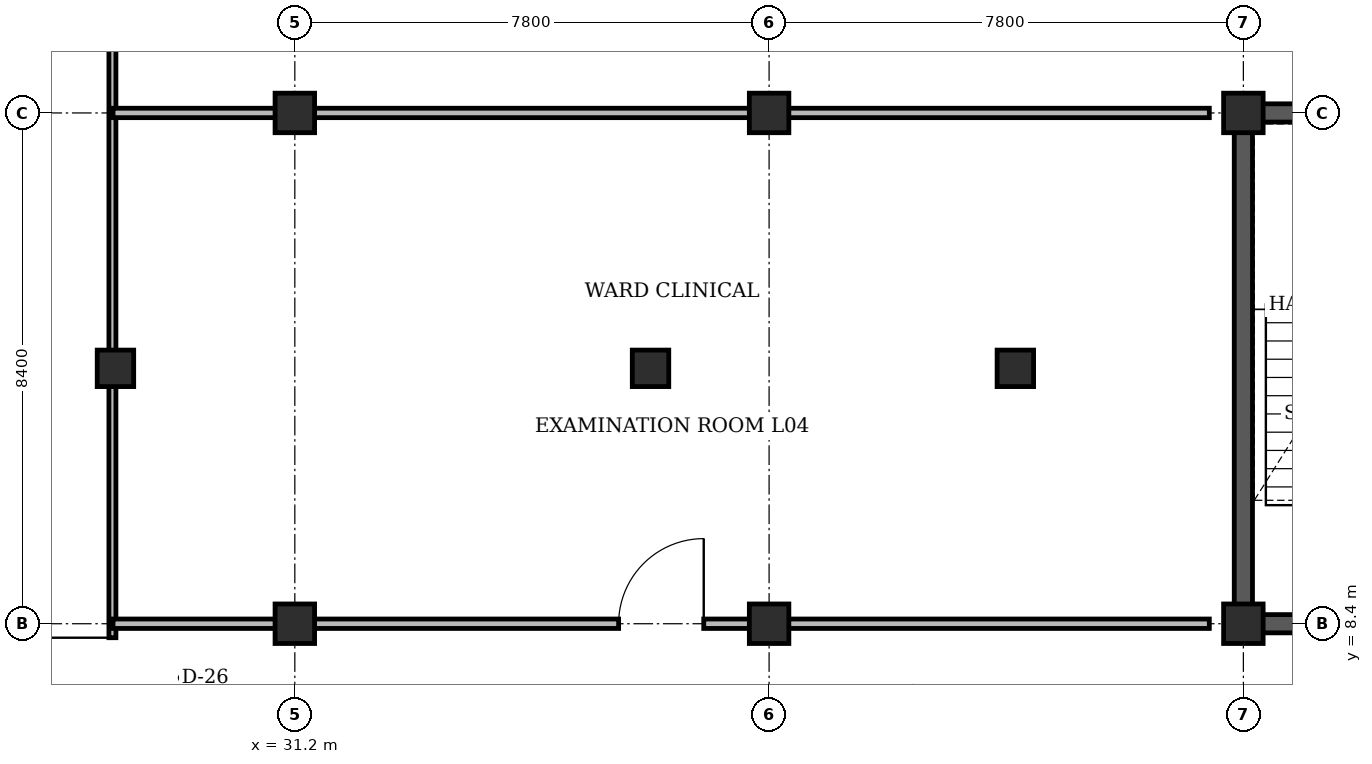
"""IFC4 building model, lengths in metres.
Left out: names, types, materials, properties, quantities, classifications, styles, units other than length and angle.
Written with IfcOpenShell. Run it as: python <this file> out.ifc"""

import sys

from ifc_helpers import new_model, si_unit, direction, frame, frame_2d, origin, origin_2d, place, context, subcontext, project, spatial, rectangle, circle, extrude, element, fill, save


model = new_model("IFC4")
c1 = context("Model", 3, precision=1e-05, world=origin(), true_north=direction((0.0, 1.0)))
c2 = subcontext(c1, "Body", "Model", "MODEL_VIEW")
j1 = project(units=[si_unit("LENGTHUNIT", "METRE"), si_unit("PLANEANGLEUNIT", "RADIAN")], contexts=[c1])
p1 = place(None, origin())
s1 = spatial("IfcSite", under=j1, at=p1, CompositionType="ELEMENT")
p2 = place(p1, origin())
s2 = spatial("IfcBuilding", under=s1, at=p2, CompositionType="ELEMENT")
p3 = place(p2, frame((0.0, 0.0, 18.0)))
s3 = spatial("IfcBuildingStorey", under=s2, at=p3, CompositionType="ELEMENT", Elevation=18.0)
p4 = place(p3, frame((46.65, 16.8, 0.0), z_axis=(0.0, 0.0, 1.0), x_axis=(1.0, 0.0, 0.0)))
e1 = element("IfcWall", 1, at=p4, inside=s3, PredefinedType="SHEAR", context=c2, shape_type="SweptSolid", body=[
    extrude(rectangle(XDim=8.1, YDim=0.3, at=frame_2d((4.05, 0.0))), origin(), (0.0, 0.0, 1.0), 3.92),
])
p5 = place(p3, frame((46.8, 8.4, 0.0), z_axis=(0.0, 0.0, 1.0), x_axis=(0.0, 1.0, 0.0)))
e2 = element("IfcWall", 2, at=p5, inside=s3, PredefinedType="SHEAR", context=c2, shape_type="SweptSolid", body=[
    extrude(rectangle(XDim=8.4, YDim=0.3, at=frame_2d((4.2, 0.0))), origin(), (0.0, 0.0, 1.0), 3.92),
])
for number, where, z_axis, x_axis in (
    (3, (31.2, 8.4, 0.0), (0.0, 0.0, 1.0), (1.0, 0.0, 0.0)),
    (4, (31.2, 16.8, 0.0), (0.0, 0.0, 1.0), (1.0, 0.0, 0.0)),
    (5, (39.0, 8.4, 0.0), (0.0, 0.0, 1.0), (1.0, 0.0, 0.0)),
    (6, (39.0, 16.8, 0.0), (0.0, 0.0, 1.0), (1.0, 0.0, 0.0)),
    (7, (46.8, 8.4, 0.0), (0.0, 0.0, 1.0), (1.0, 0.0, 0.0)),
    (8, (46.8, 16.8, 0.0), (0.0, 0.0, 1.0), (1.0, 0.0, 0.0)),
):
    element("IfcColumn", number, at=place(p3, frame(where, z_axis=z_axis, x_axis=x_axis)), inside=s3, PredefinedType="COLUMN", context=c2, shape_type="SweptSolid", body=[
        extrude(rectangle(XDim=0.65, YDim=0.65, at=origin_2d()), origin(), (0.0, 0.0, 1.0), 4.2),
    ])
for number, where, z_axis, x_axis in (
    (9, (28.25, 12.6, 0.0), (0.0, 0.0, 1.0), (1.0, 0.0, 0.0)),
    (10, (37.05, 12.6, 0.0), (0.0, 0.0, 1.0), (1.0, 0.0, 0.0)),
    (11, (43.05, 12.6, 0.0), (0.0, 0.0, 1.0), (1.0, 0.0, 0.0)),
):
    element("IfcColumn", number, at=place(p3, frame(where, z_axis=z_axis, x_axis=x_axis)), inside=s3, PredefinedType="PILASTER", context=c2, shape_type="SweptSolid", body=[
        extrude(circle(Radius=0.3, at=origin_2d()), origin(), (0.0, 0.0, 1.0), 4.2),
    ])
p6 = place(p3, frame((46.8, 8.4, 0.0), z_axis=(0.0, 0.0, 1.0), x_axis=(1.0, 0.0, 0.0)))
e12 = element("IfcWall", 12, at=p6, inside=s3, PredefinedType="SHEAR", context=c2, shape_type="SweptSolid", body=[
    extrude(rectangle(XDim=4.15, YDim=0.3, at=frame_2d((2.075, 0.0))), origin(), (0.0, 0.0, 1.0), 4.2),
])
p7 = place(p6, frame((1.515, 0.0, 0.0)))
e13 = element("IfcOpeningElement", 13, at=p7, cuts=e12, PredefinedType="OPENING", context=c2, shape_type="SweptSolid", body=[
    extrude(rectangle(XDim=1.12, YDim=2.15, at=frame_2d((0.56, 1.075))), frame((0.0, 0.16, 0.0), z_axis=(0.0, -1.0, 0.0), x_axis=(1.0, 0.0, 0.0)), (0.0, 0.0, 1.0), 0.32),
])
p8 = place(p3, frame((28.2, 6.0, 0.0), z_axis=(0.0, 0.0, 1.0), x_axis=(0.0, 1.0, 0.0)))
e14 = element("IfcWall", 14, at=p8, inside=s3, PredefinedType="PARTITIONING", context=c2, shape_type="SweptSolid", body=[
    extrude(rectangle(XDim=13.2, YDim=0.115, at=frame_2d((6.6, 0.0))), origin(), (0.0, 0.0, 1.0), 3.9),
])
p9 = place(p8, frame((0.85, 0.0, 0.0)))
e15 = element("IfcOpeningElement", 15, at=p9, cuts=e14, PredefinedType="OPENING", context=c2, shape_type="SweptSolid", body=[
    extrude(rectangle(XDim=1.32, YDim=2.15, at=frame_2d((0.66, 1.075))), frame((0.0, 0.067, 0.0), z_axis=(0.0, -1.0, 0.0), x_axis=(1.0, 0.0, 0.0)), (0.0, 0.0, 1.0), 0.135),
])
p10 = place(p3, frame((28.21, 8.4, 0.0), z_axis=(0.0, 0.0, 1.0), x_axis=(1.0, 0.0, 0.0)))
e16 = element("IfcWall", 16, at=p10, inside=s3, PredefinedType="PARTITIONING", context=c2, shape_type="SweptSolid", body=[
    extrude(rectangle(XDim=18.03, YDim=0.155, at=frame_2d((9.015, 0.0))), origin(), (0.0, 0.0, 1.0), 3.22),
])
p11 = place(p10, frame((8.315, 0.0, 0.0)))
e17 = element("IfcOpeningElement", 17, at=p11, cuts=e16, PredefinedType="OPENING", context=c2, shape_type="SweptSolid", body=[
    extrude(rectangle(XDim=1.4, YDim=2.2, at=frame_2d((0.7, 1.1))), frame((0.0, 0.087, 0.0), z_axis=(0.0, -1.0, 0.0), x_axis=(1.0, 0.0, 0.0)), (0.0, 0.0, 1.0), 0.175),
])
p12 = place(p3, frame((28.21, 16.8, 0.0), z_axis=(0.0, 0.0, 1.0), x_axis=(1.0, 0.0, 0.0)))
e18 = element("IfcWall", 18, at=p12, inside=s3, PredefinedType="PARTITIONING", context=c2, shape_type="SweptSolid", body=[
    extrude(rectangle(XDim=18.03, YDim=0.155, at=frame_2d((9.015, 0.0))), origin(), (0.0, 0.0, 1.0), 3.22),
])
p13 = place(p9, origin())
e19 = element("IfcDoor", 19, at=p13, inside=s3, OperationType="SINGLE_SWING_RIGHT", PredefinedType="DOOR", context=c2, shape_type="SweptSolid", body=[
    extrude(rectangle(XDim=1.32, YDim=2.15, at=frame_2d((0.66, 1.075))), frame((0.0, 0.025, 0.0), z_axis=(0.0, -1.0, 0.0), x_axis=(1.0, 0.0, 0.0)), (0.0, 0.0, 1.0), 0.05),
])
fill(e15, e19)
p14 = place(p11, origin())
e20 = element("IfcDoor", 20, at=p14, inside=s3, OperationType="SINGLE_SWING_RIGHT", PredefinedType="DOOR", context=c2, shape_type="SweptSolid", body=[
    extrude(rectangle(XDim=1.4, YDim=2.2, at=frame_2d((0.7, 1.1))), frame((0.0, 0.025, 0.0), z_axis=(0.0, -1.0, 0.0), x_axis=(1.0, 0.0, 0.0)), (0.0, 0.0, 1.0), 0.05),
])
fill(e17, e20)
save(model, sys.argv[1])
